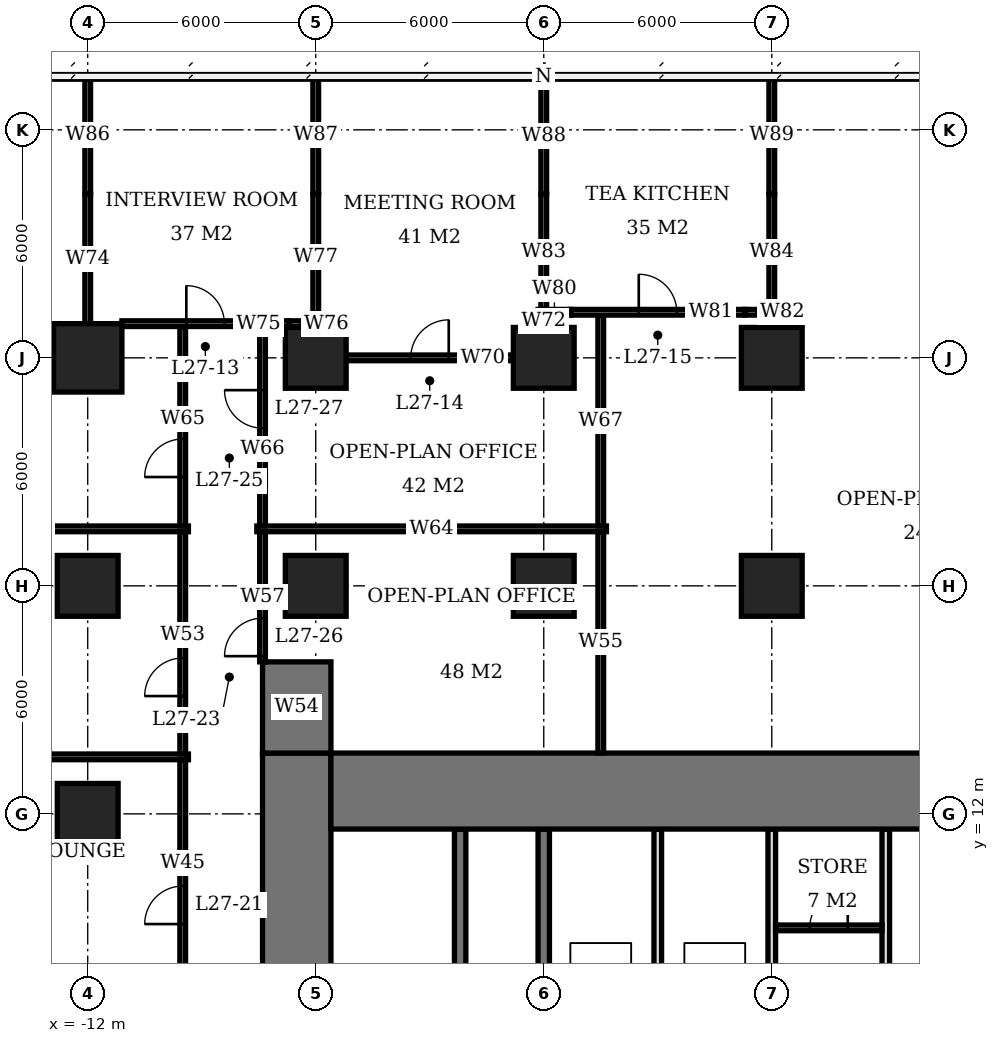
"""IFC4 building model, lengths in metres.
Left out: names, types, materials, properties, quantities, classifications, styles, units other than length and angle.
Written with IfcOpenShell. Run it as: python <this file> out.ifc"""

import sys

from ifc_helpers import new_model, si_unit, direction, frame, frame_2d, origin, origin_2d, place, context, subcontext, project, spatial, rectangle, extrude, element, fill, save


model = new_model("IFC4")
c1 = context("Model", 3, precision=1e-05, world=origin(), true_north=direction((0.0, 1.0)))
c2 = subcontext(c1, "Body", "Model", "MODEL_VIEW")
j1 = project(units=[si_unit("LENGTHUNIT", "METRE"), si_unit("PLANEANGLEUNIT", "RADIAN")], contexts=[c1])
p1 = place(None, origin())
s1 = spatial("IfcSite", under=j1, at=p1, CompositionType="ELEMENT")
p2 = place(p1, origin())
s2 = spatial("IfcBuilding", under=s1, at=p2, CompositionType="ELEMENT")
p3 = place(p2, frame((0.0, 0.0, 113.3)))
s3 = spatial("IfcBuildingStorey", under=s2, at=p3, CompositionType="ELEMENT", Elevation=113.3)
for number, where, z_axis, x_axis in (
    (1, (-12.0, 12.0, 0.0), (0.0, 0.0, 1.0), (1.0, 0.0, 0.0)),
    (2, (-12.0, 18.0, 0.0), (0.0, 0.0, 1.0), (1.0, 0.0, 0.0)),
):
    element("IfcColumn", number, at=place(p3, frame(where, z_axis=z_axis, x_axis=x_axis)), inside=s3, PredefinedType="COLUMN", context=c2, shape_type="SweptSolid", body=[
        extrude(rectangle(XDim=1.6, YDim=1.6, at=origin_2d()), origin(), (0.0, 0.0, 1.0), 3.9),
    ])
p4 = place(p3, frame((-12.0, 24.0, 0.0), z_axis=(0.0, 0.0, 1.0), x_axis=(1.0, 0.0, 0.0)))
e3 = element("IfcColumn", 3, at=p4, inside=s3, PredefinedType="COLUMN", context=c2, shape_type="SweptSolid", body=[
    extrude(rectangle(XDim=1.8, YDim=1.8, at=origin_2d()), origin(), (0.0, 0.0, 1.0), 3.9),
])
for number, where, z_axis, x_axis in (
    (4, (-6.0, 18.0, 0.0), (0.0, 0.0, 1.0), (1.0, 0.0, 0.0)),
    (5, (-6.0, 24.0, 0.0), (0.0, 0.0, 1.0), (1.0, 0.0, 0.0)),
    (6, (0.0, 18.0, 0.0), (0.0, 0.0, 1.0), (1.0, 0.0, 0.0)),
    (7, (0.0, 24.0, 0.0), (0.0, 0.0, 1.0), (1.0, 0.0, 0.0)),
    (8, (6.0, 18.0, 0.0), (0.0, 0.0, 1.0), (1.0, 0.0, 0.0)),
    (9, (6.0, 24.0, 0.0), (0.0, 0.0, 1.0), (1.0, 0.0, 0.0)),
):
    element("IfcColumn", number, at=place(p3, frame(where, z_axis=z_axis, x_axis=x_axis)), inside=s3, PredefinedType="COLUMN", context=c2, shape_type="SweptSolid", body=[
        extrude(rectangle(XDim=1.6, YDim=1.6, at=origin_2d()), origin(), (0.0, 0.0, 1.0), 3.9),
    ])
p5 = place(p3, frame((-5.6, 12.6, 0.0), z_axis=(0.0, 0.0, 1.0), x_axis=(1.0, 0.0, 0.0)))
e10 = element("IfcWall", 10, at=p5, inside=s3, PredefinedType="SHEAR", context=c2, shape_type="SweptSolid", body=[
    extrude(rectangle(XDim=23.2, YDim=2.0, at=frame_2d((11.6, 0.0))), origin(), (0.0, 0.0, 1.0), 3.9),
])
p6 = place(p3, frame((-6.5, -7.6, 0.0), z_axis=(0.0, 0.0, 1.0), x_axis=(0.0, 1.0, 0.0)))
e11 = element("IfcWall", 11, at=p6, inside=s3, PredefinedType="SHEAR", context=c2, shape_type="SweptSolid", body=[
    extrude(rectangle(XDim=21.2, YDim=1.8, at=frame_2d((10.6, 0.0))), origin(), (0.0, 0.0, 1.0), 3.9),
])
p7 = place(p6, frame((7.8, 0.0, 0.0)))
e12 = element("IfcOpeningElement", 12, at=p7, cuts=e11, PredefinedType="OPENING", context=c2, shape_type="SweptSolid", body=[
    extrude(rectangle(XDim=1.8, YDim=2.4, at=frame_2d((0.9, 1.2))), frame((0.0, 0.91, 0.0), z_axis=(0.0, -1.0, 0.0), x_axis=(1.0, 0.0, 0.0)), (0.0, 0.0, 1.0), 1.82),
])
p8 = place(p3, frame((-6.5, 13.6, 0.0), z_axis=(0.0, 0.0, 1.0), x_axis=(0.0, 1.0, 0.0)))
e13 = element("IfcWall", 13, at=p8, inside=s3, PredefinedType="SHEAR", context=c2, shape_type="SweptSolid", body=[
    extrude(rectangle(XDim=2.4, YDim=1.8, at=frame_2d((1.2, 0.0))), origin(), (0.0, 0.0, 1.0), 3.9),
])
for number, where, z_axis, x_axis in (
    (14, (0.0, 3.15, 0.0), (0.0, 0.0, 1.0), (0.0, 1.0, 0.0)),
    (15, (-2.2, 3.15, 0.0), (0.0, 0.0, 1.0), (0.0, 1.0, 0.0)),
):
    element("IfcWall", number, at=place(p3, frame(where, z_axis=z_axis, x_axis=x_axis)), inside=s3, PredefinedType="SHEAR", context=c2, shape_type="SweptSolid", body=[
        extrude(rectangle(XDim=8.45, YDim=0.3, at=frame_2d((4.225, 0.0))), origin(), (0.0, 0.0, 1.0), 3.9),
    ])
for number, where, z_axis, x_axis in (
    (16, (3.0, 6.15, 0.0), (0.0, 0.0, 1.0), (0.0, 1.0, 0.0)),
    (17, (6.0, 6.15, 0.0), (0.0, 0.0, 1.0), (0.0, 1.0, 0.0)),
    (18, (9.0, 6.15, 0.0), (0.0, 0.0, 1.0), (0.0, 1.0, 0.0)),
):
    element("IfcWall", number, at=place(p3, frame(where, z_axis=z_axis, x_axis=x_axis)), inside=s3, PredefinedType="SOLIDWALL", context=c2, shape_type="SweptSolid", body=[
        extrude(rectangle(XDim=5.45, YDim=0.2, at=frame_2d((2.725, 0.0))), origin(), (0.0, 0.0, 1.0), 3.9),
    ])
p9 = place(p3, frame((6.1, 9.0, 0.0), z_axis=(0.0, 0.0, 1.0), x_axis=(1.0, 0.0, 0.0)))
e19 = element("IfcWall", 19, at=p9, inside=s3, PredefinedType="PARTITIONING", context=c2, shape_type="SweptSolid", body=[
    extrude(rectangle(XDim=2.8, YDim=0.15, at=frame_2d((1.4, 0.0))), origin(), (0.0, 0.0, 1.0), 3.65),
])
p10 = place(p9, frame((0.9, 0.0, 0.0)))
e20 = element("IfcOpeningElement", 20, at=p10, cuts=e19, PredefinedType="OPENING", context=c2, shape_type="SweptSolid", body=[
    extrude(rectangle(XDim=1.0, YDim=2.1, at=frame_2d((0.5, 1.05))), frame((0.0, 0.085, 0.0), z_axis=(0.0, -1.0, 0.0), x_axis=(1.0, 0.0, 0.0)), (0.0, 0.0, 1.0), 0.17),
])
p11 = place(p3, frame((-5.2, 24.0, 0.0), z_axis=(0.0, 0.0, 1.0), x_axis=(1.0, 0.0, 0.0)))
e21 = element("IfcWall", 21, at=p11, inside=s3, PredefinedType="PARTITIONING", context=c2, shape_type="SweptSolid", body=[
    extrude(rectangle(XDim=4.4, YDim=0.15, at=frame_2d((2.2, 0.0))), origin(), (0.0, 0.0, 1.0), 3.65),
])
p12 = place(p11, frame((1.7, 0.0, 0.0)))
e22 = element("IfcOpeningElement", 22, at=p12, cuts=e21, PredefinedType="OPENING", context=c2, shape_type="SweptSolid", body=[
    extrude(rectangle(XDim=1.0, YDim=2.1, at=frame_2d((0.5, 1.05))), frame((0.0, 0.085, 0.0), z_axis=(0.0, -1.0, 0.0), x_axis=(1.0, 0.0, 0.0)), (0.0, 0.0, 1.0), 0.17),
])
p13 = place(p3, frame((-11.1, 24.9, 0.0), z_axis=(0.0, 0.0, 1.0), x_axis=(1.0, 0.0, 0.0)))
e23 = element("IfcWall", 23, at=p13, inside=s3, PredefinedType="PARTITIONING", context=c2, shape_type="SweptSolid", body=[
    extrude(rectangle(XDim=4.39, YDim=0.15, at=frame_2d((2.195, 0.0))), origin(), (0.0, 0.0, 1.0), 3.65),
])
p14 = place(p13, frame((1.695, 0.0, 0.0)))
e24 = element("IfcOpeningElement", 24, at=p14, cuts=e23, PredefinedType="OPENING", context=c2, shape_type="SweptSolid", body=[
    extrude(rectangle(XDim=1.0, YDim=2.1, at=frame_2d((0.5, 1.05))), frame((0.0, 0.085, 0.0), z_axis=(0.0, -1.0, 0.0), x_axis=(1.0, 0.0, 0.0)), (0.0, 0.0, 1.0), 0.17),
])
p15 = place(p3, frame((-6.71, 24.9, 0.0), z_axis=(0.0, 0.0, 1.0), x_axis=(1.0, 0.0, 0.0)))
e25 = element("IfcWall", 25, at=p15, inside=s3, PredefinedType="PARTITIONING", context=c2, shape_type="SweptSolid", body=[
    extrude(rectangle(XDim=0.785, YDim=0.15, at=frame_2d((0.393, 0.0))), origin(), (0.0, 0.0, 1.0), 2.65),
])
p16 = place(p3, frame((-0.15, 25.2, 0.0), z_axis=(0.0, 0.0, 1.0), x_axis=(1.0, 0.0, 0.0)))
e26 = element("IfcWall", 26, at=p16, inside=s3, PredefinedType="PARTITIONING", context=c2, shape_type="SweptSolid", body=[
    extrude(rectangle(XDim=0.86, YDim=0.15, at=frame_2d((0.43, 0.0))), origin(), (0.0, 0.0, 1.0), 2.65),
])
p17 = place(p3, frame((0.71, 25.2, 0.0), z_axis=(0.0, 0.0, 1.0), x_axis=(1.0, 0.0, 0.0)))
e27 = element("IfcWall", 27, at=p17, inside=s3, PredefinedType="PARTITIONING", context=c2, shape_type="SweptSolid", body=[
    extrude(rectangle(XDim=4.58, YDim=0.15, at=frame_2d((2.29, 0.0))), origin(), (0.0, 0.0, 1.0), 3.65),
])
p18 = place(p17, frame((1.79, 0.0, 0.0)))
e28 = element("IfcOpeningElement", 28, at=p18, cuts=e27, PredefinedType="OPENING", context=c2, shape_type="SweptSolid", body=[
    extrude(rectangle(XDim=1.0, YDim=2.1, at=frame_2d((0.5, 1.05))), frame((0.0, 0.085, 0.0), z_axis=(0.0, -1.0, 0.0), x_axis=(1.0, 0.0, 0.0)), (0.0, 0.0, 1.0), 0.17),
])
p19 = place(p3, frame((5.29, 25.2, 0.0), z_axis=(0.0, 0.0, 1.0), x_axis=(1.0, 0.0, 0.0)))
e29 = element("IfcWall", 29, at=p19, inside=s3, PredefinedType="PARTITIONING", context=c2, shape_type="SweptSolid", body=[
    extrude(rectangle(XDim=0.785, YDim=0.15, at=frame_2d((0.393, 0.0))), origin(), (0.0, 0.0, 1.0), 2.65),
])
p20 = place(p3, frame((-12.0, 24.9, 0.0), z_axis=(0.0, 0.0, 1.0), x_axis=(0.0, 1.0, 0.0)))
e30 = element("IfcWall", 30, at=p20, inside=s3, PredefinedType="PARTITIONING", context=c2, shape_type="SweptSolid", body=[
    extrude(rectangle(XDim=3.41, YDim=0.15, at=frame_2d((1.705, 0.0))), origin(), (0.0, 0.0, 1.0), 2.65),
])
p21 = place(p3, frame((-12.0, 28.31, 0.0), z_axis=(0.0, 0.0, 1.0), x_axis=(0.0, 1.0, 0.0)))
e31 = element("IfcWall", 31, at=p21, inside=s3, PredefinedType="PARTITIONING", context=c2, shape_type="SweptSolid", body=[
    extrude(rectangle(XDim=3.09, YDim=0.15, at=frame_2d((1.545, 0.0))), origin(), (0.0, 0.0, 1.0), 3.65),
])
p22 = place(p3, frame((-6.0, 24.975, 0.0), z_axis=(0.0, 0.0, 1.0), x_axis=(0.0, 1.0, 0.0)))
e32 = element("IfcWall", 32, at=p22, inside=s3, PredefinedType="PARTITIONING", context=c2, shape_type="SweptSolid", body=[
    extrude(rectangle(XDim=3.335, YDim=0.15, at=frame_2d((1.667, 0.0))), origin(), (0.0, 0.0, 1.0), 2.65),
])
p23 = place(p3, frame((-6.0, 28.31, 0.0), z_axis=(0.0, 0.0, 1.0), x_axis=(0.0, 1.0, 0.0)))
e33 = element("IfcWall", 33, at=p23, inside=s3, PredefinedType="PARTITIONING", context=c2, shape_type="SweptSolid", body=[
    extrude(rectangle(XDim=3.09, YDim=0.15, at=frame_2d((1.545, 0.0))), origin(), (0.0, 0.0, 1.0), 3.65),
])
p24 = place(p3, frame((0.0, 24.8, 0.0), z_axis=(0.0, 0.0, 1.0), x_axis=(0.0, 1.0, 0.0)))
e34 = element("IfcWall", 34, at=p24, inside=s3, PredefinedType="PARTITIONING", context=c2, shape_type="SweptSolid", body=[
    extrude(rectangle(XDim=0.325, YDim=0.15, at=frame_2d((0.163, 0.0))), origin(), (0.0, 0.0, 1.0), 2.65),
])
p25 = place(p3, frame((0.0, 25.275, 0.0), z_axis=(0.0, 0.0, 1.0), x_axis=(0.0, 1.0, 0.0)))
e35 = element("IfcWall", 35, at=p25, inside=s3, PredefinedType="PARTITIONING", context=c2, shape_type="SweptSolid", body=[
    extrude(rectangle(XDim=3.035, YDim=0.15, at=frame_2d((1.518, 0.0))), origin(), (0.0, 0.0, 1.0), 2.65),
])
p26 = place(p3, frame((0.0, 28.31, 0.0), z_axis=(0.0, 0.0, 1.0), x_axis=(0.0, 1.0, 0.0)))
e36 = element("IfcWall", 36, at=p26, inside=s3, PredefinedType="PARTITIONING", context=c2, shape_type="SweptSolid", body=[
    extrude(rectangle(XDim=3.04, YDim=0.15, at=frame_2d((1.52, 0.0))), origin(), (0.0, 0.0, 1.0), 3.65),
])
p27 = place(p3, frame((6.0, 25.275, 0.0), z_axis=(0.0, 0.0, 1.0), x_axis=(0.0, 1.0, 0.0)))
e37 = element("IfcWall", 37, at=p27, inside=s3, PredefinedType="PARTITIONING", context=c2, shape_type="SweptSolid", body=[
    extrude(rectangle(XDim=3.035, YDim=0.15, at=frame_2d((1.518, 0.0))), origin(), (0.0, 0.0, 1.0), 2.65),
])
p28 = place(p3, frame((6.0, 28.31, 0.0), z_axis=(0.0, 0.0, 1.0), x_axis=(0.0, 1.0, 0.0)))
e38 = element("IfcWall", 38, at=p28, inside=s3, PredefinedType="PARTITIONING", context=c2, shape_type="SweptSolid", body=[
    extrude(rectangle(XDim=3.09, YDim=0.15, at=frame_2d((1.545, 0.0))), origin(), (0.0, 0.0, 1.0), 3.65),
])
p29 = place(p3, frame((-21.59, 13.5, 0.0), z_axis=(0.0, 0.0, 1.0), x_axis=(1.0, 0.0, 0.0)))
e39 = element("IfcWall", 39, at=p29, inside=s3, PredefinedType="PARTITIONING", context=c2, shape_type="SweptSolid", body=[
    extrude(rectangle(XDim=12.24, YDim=0.15, at=frame_2d((6.12, 0.0))), origin(), (0.0, 0.0, 1.0), 3.65),
])
p30 = place(p3, frame((-17.708, 19.5, 0.0), z_axis=(0.0, 0.0, 1.0), x_axis=(1.0, 0.0, 0.0)))
e40 = element("IfcWall", 40, at=p30, inside=s3, PredefinedType="PARTITIONING", context=c2, shape_type="SweptSolid", body=[
    extrude(rectangle(XDim=8.358, YDim=0.15, at=frame_2d((4.179, 0.0))), origin(), (0.0, 0.0, 1.0), 3.65),
])
p31 = place(p3, frame((-9.5, 7.575, 0.0), z_axis=(0.0, 0.0, 1.0), x_axis=(0.0, 1.0, 0.0)))
e41 = element("IfcWall", 41, at=p31, inside=s3, PredefinedType="PARTITIONING", context=c2, shape_type="SweptSolid", body=[
    extrude(rectangle(XDim=5.85, YDim=0.15, at=frame_2d((2.925, 0.0))), origin(), (0.0, 0.0, 1.0), 3.65),
])
p32 = place(p31, frame((1.525, 0.0, 0.0)))
e42 = element("IfcOpeningElement", 42, at=p32, cuts=e41, PredefinedType="OPENING", context=c2, shape_type="SweptSolid", body=[
    extrude(rectangle(XDim=1.0, YDim=2.1, at=frame_2d((0.5, 1.05))), frame((0.0, 0.085, 0.0), z_axis=(0.0, -1.0, 0.0), x_axis=(1.0, 0.0, 0.0)), (0.0, 0.0, 1.0), 0.17),
])
p33 = place(p3, frame((-9.5, 13.575, 0.0), z_axis=(0.0, 0.0, 1.0), x_axis=(0.0, 1.0, 0.0)))
e43 = element("IfcWall", 43, at=p33, inside=s3, PredefinedType="PARTITIONING", context=c2, shape_type="SweptSolid", body=[
    extrude(rectangle(XDim=5.85, YDim=0.15, at=frame_2d((2.925, 0.0))), origin(), (0.0, 0.0, 1.0), 3.65),
])
p34 = place(p33, frame((1.525, 0.0, 0.0)))
e44 = element("IfcOpeningElement", 44, at=p34, cuts=e43, PredefinedType="OPENING", context=c2, shape_type="SweptSolid", body=[
    extrude(rectangle(XDim=1.0, YDim=2.1, at=frame_2d((0.5, 1.05))), frame((0.0, 0.085, 0.0), z_axis=(0.0, -1.0, 0.0), x_axis=(1.0, 0.0, 0.0)), (0.0, 0.0, 1.0), 0.17),
])
p35 = place(p3, frame((-9.5, 19.575, 0.0), z_axis=(0.0, 0.0, 1.0), x_axis=(0.0, 1.0, 0.0)))
e45 = element("IfcWall", 45, at=p35, inside=s3, PredefinedType="PARTITIONING", context=c2, shape_type="SweptSolid", body=[
    extrude(rectangle(XDim=5.25, YDim=0.15, at=frame_2d((2.625, 0.0))), origin(), (0.0, 0.0, 1.0), 3.65),
])
p36 = place(p35, frame((1.289, 0.0, 0.0)))
e46 = element("IfcOpeningElement", 46, at=p36, cuts=e45, PredefinedType="OPENING", context=c2, shape_type="SweptSolid", body=[
    extrude(rectangle(XDim=1.0, YDim=2.1, at=frame_2d((0.5, 1.05))), frame((0.0, 0.085, 0.0), z_axis=(0.0, -1.0, 0.0), x_axis=(1.0, 0.0, 0.0)), (0.0, 0.0, 1.0), 0.17),
])
p37 = place(p3, frame((-7.4, 16.0, 0.0), z_axis=(0.0, 0.0, 1.0), x_axis=(0.0, 1.0, 0.0)))
e47 = element("IfcWall", 47, at=p37, inside=s3, PredefinedType="PARTITIONING", context=c2, shape_type="SweptSolid", body=[
    extrude(rectangle(XDim=3.425, YDim=0.15, at=frame_2d((1.712, 0.0))), origin(), (0.0, 0.0, 1.0), 3.65),
])
p38 = place(p37, frame((0.15, 0.0, 0.0)))
e48 = element("IfcOpeningElement", 48, at=p38, cuts=e47, PredefinedType="OPENING", context=c2, shape_type="SweptSolid", body=[
    extrude(rectangle(XDim=1.0, YDim=2.1, at=frame_2d((0.5, 1.05))), frame((0.0, 0.085, 0.0), z_axis=(0.0, -1.0, 0.0), x_axis=(1.0, 0.0, 0.0)), (0.0, 0.0, 1.0), 0.17),
])
p39 = place(p3, frame((-7.4, 19.575, 0.0), z_axis=(0.0, 0.0, 1.0), x_axis=(0.0, 1.0, 0.0)))
e49 = element("IfcWall", 49, at=p39, inside=s3, PredefinedType="PARTITIONING", context=c2, shape_type="SweptSolid", body=[
    extrude(rectangle(XDim=5.25, YDim=0.15, at=frame_2d((2.625, 0.0))), origin(), (0.0, 0.0, 1.0), 3.65),
])
p40 = place(p39, frame((2.575, 0.0, 0.0)))
e50 = element("IfcOpeningElement", 50, at=p40, cuts=e49, PredefinedType="OPENING", context=c2, shape_type="SweptSolid", body=[
    extrude(rectangle(XDim=1.0, YDim=2.1, at=frame_2d((0.5, 1.05))), frame((0.0, 0.085, 0.0), z_axis=(0.0, -1.0, 0.0), x_axis=(1.0, 0.0, 0.0)), (0.0, 0.0, 1.0), 0.17),
])
p41 = place(p3, frame((-7.55, 19.5, 0.0), z_axis=(0.0, 0.0, 1.0), x_axis=(1.0, 0.0, 0.0)))
e51 = element("IfcWall", 51, at=p41, inside=s3, PredefinedType="PARTITIONING", context=c2, shape_type="SweptSolid", body=[
    extrude(rectangle(XDim=9.2, YDim=0.15, at=frame_2d((4.6, 0.0))), origin(), (0.0, 0.0, 1.0), 3.65),
])
p42 = place(p3, frame((1.5, 13.6, 0.0), z_axis=(0.0, 0.0, 1.0), x_axis=(0.0, 1.0, 0.0)))
e52 = element("IfcWall", 52, at=p42, inside=s3, PredefinedType="PARTITIONING", context=c2, shape_type="SweptSolid", body=[
    extrude(rectangle(XDim=5.825, YDim=0.15, at=frame_2d((2.913, 0.0))), origin(), (0.0, 0.0, 1.0), 3.65),
])
p43 = place(p3, frame((1.5, 19.575, 0.0), z_axis=(0.0, 0.0, 1.0), x_axis=(0.0, 1.0, 0.0)))
e53 = element("IfcWall", 53, at=p43, inside=s3, PredefinedType="PARTITIONING", context=c2, shape_type="SweptSolid", body=[
    extrude(rectangle(XDim=5.55, YDim=0.15, at=frame_2d((2.775, 0.0))), origin(), (0.0, 0.0, 1.0), 3.65),
])
p44 = place(p10, origin())
e54 = element("IfcDoor", 54, at=p44, inside=s3, OperationType="SINGLE_SWING_RIGHT", PredefinedType="DOOR", context=c2, shape_type="SweptSolid", body=[
    extrude(rectangle(XDim=1.0, YDim=2.1, at=frame_2d((0.5, 1.05))), frame((0.0, 0.025, 0.0), z_axis=(0.0, -1.0, 0.0), x_axis=(1.0, 0.0, 0.0)), (0.0, 0.0, 1.0), 0.05),
])
fill(e20, e54)
p45 = place(p14, origin())
e55 = element("IfcDoor", 55, at=p45, inside=s3, OperationType="SINGLE_SWING_LEFT", PredefinedType="DOOR", context=c2, shape_type="SweptSolid", body=[
    extrude(rectangle(XDim=1.0, YDim=2.1, at=frame_2d((0.5, 1.05))), frame((0.0, 0.025, 0.0), z_axis=(0.0, -1.0, 0.0), x_axis=(1.0, 0.0, 0.0)), (0.0, 0.0, 1.0), 0.05),
])
fill(e24, e55)
p46 = place(p12, origin())
e56 = element("IfcDoor", 56, at=p46, inside=s3, OperationType="SINGLE_SWING_RIGHT", PredefinedType="DOOR", context=c2, shape_type="SweptSolid", body=[
    extrude(rectangle(XDim=1.0, YDim=2.1, at=frame_2d((0.5, 1.05))), frame((0.0, 0.025, 0.0), z_axis=(0.0, -1.0, 0.0), x_axis=(1.0, 0.0, 0.0)), (0.0, 0.0, 1.0), 0.05),
])
fill(e22, e56)
p47 = place(p18, origin())
e57 = element("IfcDoor", 57, at=p47, inside=s3, OperationType="SINGLE_SWING_LEFT", PredefinedType="DOOR", context=c2, shape_type="SweptSolid", body=[
    extrude(rectangle(XDim=1.0, YDim=2.1, at=frame_2d((0.5, 1.05))), frame((0.0, 0.025, 0.0), z_axis=(0.0, -1.0, 0.0), x_axis=(1.0, 0.0, 0.0)), (0.0, 0.0, 1.0), 0.05),
])
fill(e28, e57)
p48 = place(p32, origin())
e58 = element("IfcDoor", 58, at=p48, inside=s3, OperationType="SINGLE_SWING_LEFT", PredefinedType="DOOR", context=c2, shape_type="SweptSolid", body=[
    extrude(rectangle(XDim=1.0, YDim=2.1, at=frame_2d((0.5, 1.05))), frame((0.0, 0.025, 0.0), z_axis=(0.0, -1.0, 0.0), x_axis=(1.0, 0.0, 0.0)), (0.0, 0.0, 1.0), 0.05),
])
fill(e42, e58)
p49 = place(p34, origin())
e59 = element("IfcDoor", 59, at=p49, inside=s3, OperationType="SINGLE_SWING_LEFT", PredefinedType="DOOR", context=c2, shape_type="SweptSolid", body=[
    extrude(rectangle(XDim=1.0, YDim=2.1, at=frame_2d((0.5, 1.05))), frame((0.0, 0.025, 0.0), z_axis=(0.0, -1.0, 0.0), x_axis=(1.0, 0.0, 0.0)), (0.0, 0.0, 1.0), 0.05),
])
fill(e44, e59)
p50 = place(p36, origin())
e60 = element("IfcDoor", 60, at=p50, inside=s3, OperationType="SINGLE_SWING_LEFT", PredefinedType="DOOR", context=c2, shape_type="SweptSolid", body=[
    extrude(rectangle(XDim=1.0, YDim=2.1, at=frame_2d((0.5, 1.05))), frame((0.0, 0.025, 0.0), z_axis=(0.0, -1.0, 0.0), x_axis=(1.0, 0.0, 0.0)), (0.0, 0.0, 1.0), 0.05),
])
fill(e46, e60)
p51 = place(p38, origin())
e61 = element("IfcDoor", 61, at=p51, inside=s3, OperationType="SINGLE_SWING_LEFT", PredefinedType="DOOR", context=c2, shape_type="SweptSolid", body=[
    extrude(rectangle(XDim=1.0, YDim=2.1, at=frame_2d((0.5, 1.05))), frame((0.0, 0.025, 0.0), z_axis=(0.0, -1.0, 0.0), x_axis=(1.0, 0.0, 0.0)), (0.0, 0.0, 1.0), 0.05),
])
fill(e48, e61)
p52 = place(p40, origin())
e62 = element("IfcDoor", 62, at=p52, inside=s3, OperationType="SINGLE_SWING_RIGHT", PredefinedType="DOOR", context=c2, shape_type="SweptSolid", body=[
    extrude(rectangle(XDim=1.0, YDim=2.1, at=frame_2d((0.5, 1.05))), frame((0.0, 0.025, 0.0), z_axis=(0.0, -1.0, 0.0), x_axis=(1.0, 0.0, 0.0)), (0.0, 0.0, 1.0), 0.05),
])
fill(e50, e62)
save(model, sys.argv[1])
